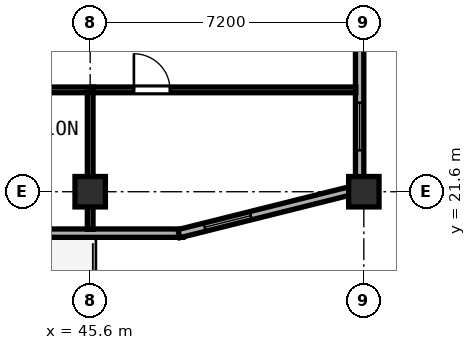
"""IFC4 building model, lengths in metres.
Left out: names, types, materials, properties, quantities, classifications, styles, units other than length and angle.
Written with IfcOpenShell. Run it as: python <this file> out.ifc"""

import sys

from ifc_helpers import new_model, si_unit, direction, frame, frame_2d, origin, origin_2d, place, context, subcontext, project, spatial, rectangle, hollow_rectangle, extrude, element, fill, save


model = new_model("IFC4")
c1 = context("Model", 3, precision=1e-05, world=origin(), true_north=direction((0.0, 1.0)))
c2 = subcontext(c1, "Body", "Model", "MODEL_VIEW")
j1 = project(units=[si_unit("LENGTHUNIT", "METRE"), si_unit("PLANEANGLEUNIT", "RADIAN")], contexts=[c1])
p1 = place(None, origin())
s1 = spatial("IfcSite", under=j1, at=p1, CompositionType="ELEMENT")
p2 = place(p1, origin())
s2 = spatial("IfcBuilding", under=s1, at=p2, CompositionType="ELEMENT")
p3 = place(p2, frame((0.0, 0.0, 246.75)))
s3 = spatial("IfcBuildingStorey", under=s2, at=p3, CompositionType="ELEMENT", Elevation=246.75)
for number, where, z_axis, x_axis in (
    (1, (52.8, 21.6, 0.0), (0.0, 0.0, 1.0), (1.0, 0.0, 0.0)),
    (2, (45.6, 21.6, 0.0), (0.0, 0.0, 1.0), (1.0, 0.0, 0.0)),
):
    element("IfcColumn", number, at=place(p3, frame(where, z_axis=z_axis, x_axis=x_axis)), inside=s3, PredefinedType="COLUMN", context=c2, shape_type="SweptSolid", body=[
        extrude(hollow_rectangle(XDim=0.8, YDim=0.8, WallThickness=0.03, at=origin_2d()), origin(), (0.0, 0.0, 1.0), 3.85),
    ])
p4 = place(p3, frame((28.759, 20.51, 0.0), z_axis=(0.0, 0.0, 1.0), x_axis=(1.0, 0.0, 0.0)))
e3 = element("IfcWall", 3, at=p4, inside=s3, PredefinedType="SOLIDWALL", context=c2, shape_type="SweptSolid", body=[
    extrude(rectangle(XDim=19.283, YDim=0.22, at=frame_2d((9.642, 0.0))), origin(), (0.0, 0.0, 1.0), 3.67),
])
p5 = place(p4, frame((15.641, 0.0, 0.0), z_axis=(0.0, 0.0, 1.0), x_axis=(-1.0, 0.0, 0.0)))
e4 = element("IfcOpeningElement", 4, at=p5, cuts=e3, PredefinedType="OPENING", context=c2, shape_type="SweptSolid", body=[
    extrude(rectangle(XDim=1.2, YDim=2.15, at=frame_2d((0.6, 1.075))), frame((0.0, 0.12, 0.0), z_axis=(0.0, -1.0, 0.0), x_axis=(1.0, 0.0, 0.0)), (0.0, 0.0, 1.0), 0.24),
])
p6 = place(p3, frame((47.933, 20.497, 0.0), z_axis=(0.0, 0.0, 1.0), x_axis=(0.970133159038, 0.242572986408, 0.0)))
e5 = element("IfcWall", 5, at=p6, inside=s3, PredefinedType="SOLIDWALL", context=c2, shape_type="SweptSolid", body=[
    extrude(rectangle(XDim=4.613, YDim=0.22, at=frame_2d((2.306, 0.0))), origin(), (0.0, 0.0, 1.0), 3.315),
])
p7 = place(p6, frame((0.7, 0.0, 0.85)))
e6 = element("IfcOpeningElement", 6, at=p7, cuts=e5, PredefinedType="OPENING", context=c2, shape_type="SweptSolid", body=[
    extrude(rectangle(XDim=1.25, YDim=1.95, at=frame_2d((0.625, 0.975))), frame((0.0, 0.12, 0.0), z_axis=(0.0, -1.0, 0.0), x_axis=(1.0, 0.0, 0.0)), (0.0, 0.0, 1.0), 0.24),
])
p8 = place(p3, frame((52.69, 21.992, 0.0), z_axis=(0.0, 0.0, 1.0), x_axis=(0.0, 1.0, 0.0)))
e7 = element("IfcWall", 7, at=p8, inside=s3, PredefinedType="SOLIDWALL", context=c2, shape_type="SweptSolid", body=[
    extrude(rectangle(XDim=5.266, YDim=0.22, at=frame_2d((2.633, 0.0))), origin(), (0.0, 0.0, 1.0), 3.315),
])
p9 = place(p8, frame((0.7, 0.0, 0.85)))
e8 = element("IfcOpeningElement", 8, at=p9, cuts=e7, PredefinedType="OPENING", context=c2, shape_type="SweptSolid", body=[
    extrude(rectangle(XDim=1.25, YDim=1.95, at=frame_2d((0.625, 0.975))), frame((0.0, 0.12, 0.0), z_axis=(0.0, -1.0, 0.0), x_axis=(1.0, 0.0, 0.0)), (0.0, 0.0, 1.0), 0.24),
])
p10 = place(p3, frame((31.282, 24.28, 0.0), z_axis=(0.0, 0.0, 1.0), x_axis=(1.0, 0.0, 0.0)))
e9 = element("IfcWall", 9, at=p10, inside=s3, PredefinedType="PARTITIONING", context=c2, shape_type="SweptSolid", body=[
    extrude(rectangle(XDim=14.398, YDim=0.15, at=frame_2d((7.199, 0.0))), origin(), (0.0, 0.0, 1.0), 3.67),
])
p11 = place(p10, frame((7.513, 0.0, 0.0), z_axis=(0.0, 0.0, 1.0), x_axis=(-1.0, 0.0, 0.0)))
e10 = element("IfcOpeningElement", 10, at=p11, cuts=e9, PredefinedType="OPENING", context=c2, shape_type="SweptSolid", body=[
    extrude(rectangle(XDim=0.95, YDim=2.12, at=frame_2d((0.475, 1.06))), frame((0.0, 0.085, 0.0), z_axis=(0.0, -1.0, 0.0), x_axis=(1.0, 0.0, 0.0)), (0.0, 0.0, 1.0), 0.17),
])
p12 = place(p3, frame((45.6, 20.612, 0.0), z_axis=(0.0, 0.0, 1.0), x_axis=(0.0, 1.0, 0.0)))
e11 = element("IfcWall", 11, at=p12, inside=s3, PredefinedType="PARTITIONING", context=c2, shape_type="SweptSolid", body=[
    extrude(rectangle(XDim=3.608, YDim=0.15, at=frame_2d((1.804, 0.0))), origin(), (0.0, 0.0, 1.0), 3.155),
])
p13 = place(p3, frame((45.682, 24.28, 0.0), z_axis=(0.0, 0.0, 1.0), x_axis=(1.0, 0.0, 0.0)))
e12 = element("IfcWall", 12, at=p13, inside=s3, PredefinedType="PARTITIONING", context=c2, shape_type="SweptSolid", body=[
    extrude(rectangle(XDim=6.906, YDim=0.15, at=frame_2d((3.453, 0.0))), origin(), (0.0, 0.0, 1.0), 3.67),
])
p14 = place(p13, frame((2.018, 0.0, 0.0), z_axis=(0.0, 0.0, 1.0), x_axis=(-1.0, 0.0, 0.0)))
e13 = element("IfcOpeningElement", 13, at=p14, cuts=e12, PredefinedType="OPENING", context=c2, shape_type="SweptSolid", body=[
    extrude(rectangle(XDim=0.95, YDim=2.12, at=frame_2d((0.475, 1.06))), frame((0.0, 0.085, 0.0), z_axis=(0.0, -1.0, 0.0), x_axis=(1.0, 0.0, 0.0)), (0.0, 0.0, 1.0), 0.17),
])
p15 = place(p7, origin())
e14 = element("IfcWindow", 14, at=p15, inside=s3, PartitioningType="SINGLE_PANEL", PredefinedType="WINDOW", context=c2, shape_type="SweptSolid", body=[
    extrude(rectangle(XDim=1.25, YDim=1.95, at=frame_2d((0.625, 0.975))), frame((0.0, 0.03, 0.0), z_axis=(0.0, -1.0, 0.0), x_axis=(1.0, 0.0, 0.0)), (0.0, 0.0, 1.0), 0.06),
])
fill(e6, e14)
p16 = place(p9, origin())
e15 = element("IfcWindow", 15, at=p16, inside=s3, PartitioningType="SINGLE_PANEL", PredefinedType="WINDOW", context=c2, shape_type="SweptSolid", body=[
    extrude(rectangle(XDim=1.25, YDim=1.95, at=frame_2d((0.625, 0.975))), frame((0.0, 0.03, 0.0), z_axis=(0.0, -1.0, 0.0), x_axis=(1.0, 0.0, 0.0)), (0.0, 0.0, 1.0), 0.06),
])
fill(e8, e15)
p17 = place(p14, origin())
e16 = element("IfcDoor", 16, at=p17, inside=s3, OperationType="SINGLE_SWING_RIGHT", PredefinedType="DOOR", context=c2, shape_type="SweptSolid", body=[
    extrude(rectangle(XDim=0.95, YDim=2.12, at=frame_2d((0.475, 1.06))), frame((0.0, 0.025, 0.0), z_axis=(0.0, -1.0, 0.0), x_axis=(1.0, 0.0, 0.0)), (0.0, 0.0, 1.0), 0.05),
])
fill(e13, e16)
save(model, sys.argv[1])
